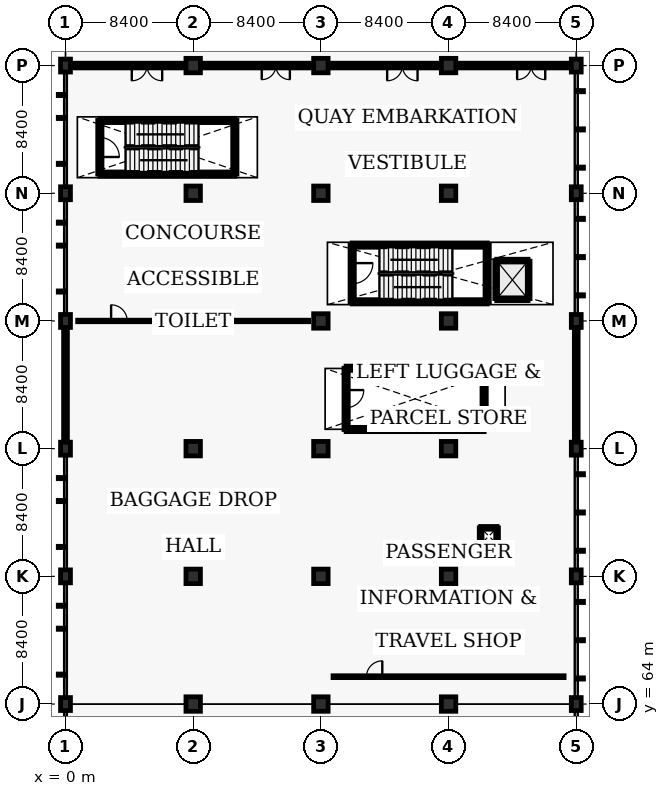
"""IFC4 building model, lengths in metres.
Left out: names, types, materials, properties, quantities, classifications, styles, units other than length and angle.
Written with IfcOpenShell. Run it as: python <this file> out.ifc"""

import sys

from ifc_helpers import new_model, si_unit, direction, frame, frame_2d, origin, origin_2d, place, context, subcontext, project, spatial, rectangle, circle, extrude, element, fill, save


model = new_model("IFC4")
c1 = context("Model", 3, precision=1e-05, world=origin(), true_north=direction((0.0, 1.0)))
c2 = subcontext(c1, "Body", "Model", "MODEL_VIEW")
j1 = project(units=[si_unit("LENGTHUNIT", "METRE"), si_unit("PLANEANGLEUNIT", "RADIAN")], contexts=[c1])
p1 = place(None, origin())
s1 = spatial("IfcSite", under=j1, at=p1, CompositionType="ELEMENT")
p2 = place(p1, origin())
s2 = spatial("IfcBuilding", under=s1, at=p2, CompositionType="ELEMENT")
p3 = place(p2, origin())
s3 = spatial("IfcBuildingStorey", under=s2, at=p3, CompositionType="ELEMENT", Elevation=0.0)
for number, where, z_axis, x_axis in (
    (1, (0.0, 64.0, -0.46), (0.0, 0.0, 1.0), (1.0, 0.0, 0.0)),
    (2, (0.0, 72.4, -0.46), (0.0, 0.0, 1.0), (1.0, 0.0, 0.0)),
    (3, (0.0, 80.8, -0.46), (0.0, 0.0, 1.0), (1.0, 0.0, 0.0)),
    (4, (0.0, 89.2, -0.46), (0.0, 0.0, 1.0), (1.0, 0.0, 0.0)),
    (5, (0.0, 97.6, -0.46), (0.0, 0.0, 1.0), (1.0, 0.0, 0.0)),
    (6, (0.0, 106.0, -0.46), (0.0, 0.0, 1.0), (1.0, 0.0, 0.0)),
):
    element("IfcColumn", number, at=place(p3, frame(where, z_axis=z_axis, x_axis=x_axis)), inside=s3, PredefinedType="COLUMN", context=c2, shape_type="SweptSolid", body=[
        extrude(rectangle(XDim=0.65, YDim=0.85, at=origin_2d()), origin(), (0.0, 0.0, 1.0), 5.9),
    ])
for number, where, z_axis, x_axis in (
    (7, (8.4, 64.0, -0.46), (0.0, 0.0, 1.0), (1.0, 0.0, 0.0)),
    (8, (8.4, 72.4, -0.46), (0.0, 0.0, 1.0), (1.0, 0.0, 0.0)),
    (9, (8.4, 80.8, -0.46), (0.0, 0.0, 1.0), (1.0, 0.0, 0.0)),
    (10, (8.4, 89.2, -0.46), (0.0, 0.0, 1.0), (1.0, 0.0, 0.0)),
    (11, (8.4, 97.6, -0.46), (0.0, 0.0, 1.0), (1.0, 0.0, 0.0)),
    (12, (8.4, 106.0, -0.46), (0.0, 0.0, 1.0), (1.0, 0.0, 0.0)),
    (13, (16.8, 64.0, -0.46), (0.0, 0.0, 1.0), (1.0, 0.0, 0.0)),
    (14, (16.8, 72.4, -0.46), (0.0, 0.0, 1.0), (1.0, 0.0, 0.0)),
    (15, (16.8, 80.8, -0.46), (0.0, 0.0, 1.0), (1.0, 0.0, 0.0)),
    (16, (16.8, 89.2, -0.46), (0.0, 0.0, 1.0), (1.0, 0.0, 0.0)),
    (17, (16.8, 97.6, -0.46), (0.0, 0.0, 1.0), (1.0, 0.0, 0.0)),
    (18, (16.8, 106.0, -0.46), (0.0, 0.0, 1.0), (1.0, 0.0, 0.0)),
    (19, (25.2, 64.0, -0.46), (0.0, 0.0, 1.0), (1.0, 0.0, 0.0)),
    (20, (25.2, 72.4, -0.46), (0.0, 0.0, 1.0), (1.0, 0.0, 0.0)),
    (21, (25.2, 80.8, -0.46), (0.0, 0.0, 1.0), (1.0, 0.0, 0.0)),
    (22, (25.2, 89.2, -0.46), (0.0, 0.0, 1.0), (1.0, 0.0, 0.0)),
    (23, (25.2, 97.6, -0.46), (0.0, 0.0, 1.0), (1.0, 0.0, 0.0)),
    (24, (25.2, 106.0, -0.46), (0.0, 0.0, 1.0), (1.0, 0.0, 0.0)),
):
    element("IfcColumn", number, at=place(p3, frame(where, z_axis=z_axis, x_axis=x_axis)), inside=s3, PredefinedType="COLUMN", context=c2, shape_type="SweptSolid", body=[
        extrude(circle(Radius=0.475, at=origin_2d()), origin(), (0.0, 0.0, 1.0), 5.9),
    ])
for number, where, z_axis, x_axis in (
    (25, (33.6, 64.0, -0.46), (0.0, 0.0, 1.0), (1.0, 0.0, 0.0)),
    (26, (33.6, 72.4, -0.46), (0.0, 0.0, 1.0), (1.0, 0.0, 0.0)),
    (27, (33.6, 80.8, -0.46), (0.0, 0.0, 1.0), (1.0, 0.0, 0.0)),
    (28, (33.6, 89.2, -0.46), (0.0, 0.0, 1.0), (1.0, 0.0, 0.0)),
    (29, (33.6, 97.6, -0.46), (0.0, 0.0, 1.0), (1.0, 0.0, 0.0)),
    (30, (33.6, 106.0, -0.46), (0.0, 0.0, 1.0), (1.0, 0.0, 0.0)),
):
    element("IfcColumn", number, at=place(p3, frame(where, z_axis=z_axis, x_axis=x_axis)), inside=s3, PredefinedType="COLUMN", context=c2, shape_type="SweptSolid", body=[
        extrude(rectangle(XDim=0.65, YDim=0.85, at=origin_2d()), origin(), (0.0, 0.0, 1.0), 5.9),
    ])
p4 = place(p3, frame((7.925, 106.0, 0.0), z_axis=(0.0, 0.0, 1.0), x_axis=(-1.0, 0.0, 0.0)))
e31 = element("IfcWall", 31, at=p4, inside=s3, PredefinedType="SOLIDWALL", context=c2, shape_type="SweptSolid", body=[
    extrude(rectangle(XDim=7.6, YDim=0.31, at=frame_2d((3.8, 0.0))), origin(), (0.0, 0.0, 1.0), 4.795),
])
p5 = place(p4, frame((1.565, 0.0, 0.0)))
e32 = element("IfcOpeningElement", 32, at=p5, cuts=e31, PredefinedType="OPENING", context=c2, shape_type="SweptSolid", body=[
    extrude(rectangle(XDim=2.0, YDim=2.2, at=frame_2d((1.0, 1.1))), frame((0.0, 0.165, 0.0), z_axis=(0.0, -1.0, 0.0), x_axis=(1.0, 0.0, 0.0)), (0.0, 0.0, 1.0), 0.33),
])
p6 = place(p4, frame((4.365, 0.0, 1.0)))
e33 = element("IfcOpeningElement", 33, at=p6, cuts=e31, PredefinedType="OPENING", context=c2, shape_type="SweptSolid", body=[
    extrude(rectangle(XDim=2.6, YDim=1.7, at=frame_2d((1.3, 0.85))), frame((0.0, 0.165, 0.0), z_axis=(0.0, -1.0, 0.0), x_axis=(1.0, 0.0, 0.0)), (0.0, 0.0, 1.0), 0.33),
])
p7 = place(p3, frame((16.325, 106.0, 0.0), z_axis=(0.0, 0.0, 1.0), x_axis=(-1.0, 0.0, 0.0)))
e34 = element("IfcWall", 34, at=p7, inside=s3, PredefinedType="SOLIDWALL", context=c2, shape_type="SweptSolid", body=[
    extrude(rectangle(XDim=7.45, YDim=0.31, at=frame_2d((3.725, 0.0))), origin(), (0.0, 0.0, 1.0), 4.785),
])
p8 = place(p7, frame((1.565, 0.0, 0.0)))
e35 = element("IfcOpeningElement", 35, at=p8, cuts=e34, PredefinedType="OPENING", context=c2, shape_type="SweptSolid", body=[
    extrude(rectangle(XDim=1.85, YDim=2.2, at=frame_2d((0.925, 1.1))), frame((0.0, 0.165, 0.0), z_axis=(0.0, -1.0, 0.0), x_axis=(1.0, 0.0, 0.0)), (0.0, 0.0, 1.0), 0.33),
])
p9 = place(p7, frame((4.365, 0.0, 1.0)))
e36 = element("IfcOpeningElement", 36, at=p9, cuts=e34, PredefinedType="OPENING", context=c2, shape_type="SweptSolid", body=[
    extrude(rectangle(XDim=2.3, YDim=1.7, at=frame_2d((1.15, 0.85))), frame((0.0, 0.165, 0.0), z_axis=(0.0, -1.0, 0.0), x_axis=(1.0, 0.0, 0.0)), (0.0, 0.0, 1.0), 0.33),
])
p10 = place(p3, frame((24.725, 106.0, 0.0), z_axis=(0.0, 0.0, 1.0), x_axis=(-1.0, 0.0, 0.0)))
e37 = element("IfcWall", 37, at=p10, inside=s3, PredefinedType="SOLIDWALL", context=c2, shape_type="SweptSolid", body=[
    extrude(rectangle(XDim=7.45, YDim=0.31, at=frame_2d((3.725, 0.0))), origin(), (0.0, 0.0, 1.0), 4.785),
])
p11 = place(p10, frame((1.565, 0.0, 0.0)))
e38 = element("IfcOpeningElement", 38, at=p11, cuts=e37, PredefinedType="OPENING", context=c2, shape_type="SweptSolid", body=[
    extrude(rectangle(XDim=2.0, YDim=2.2, at=frame_2d((1.0, 1.1))), frame((0.0, 0.165, 0.0), z_axis=(0.0, -1.0, 0.0), x_axis=(1.0, 0.0, 0.0)), (0.0, 0.0, 1.0), 0.33),
])
p12 = place(p10, frame((4.365, 0.0, 1.0)))
e39 = element("IfcOpeningElement", 39, at=p12, cuts=e37, PredefinedType="OPENING", context=c2, shape_type="SweptSolid", body=[
    extrude(rectangle(XDim=2.6, YDim=1.7, at=frame_2d((1.3, 0.85))), frame((0.0, 0.165, 0.0), z_axis=(0.0, -1.0, 0.0), x_axis=(1.0, 0.0, 0.0)), (0.0, 0.0, 1.0), 0.33),
])
p13 = place(p3, frame((33.275, 106.0, 0.0), z_axis=(0.0, 0.0, 1.0), x_axis=(-1.0, 0.0, 0.0)))
e40 = element("IfcWall", 40, at=p13, inside=s3, PredefinedType="SOLIDWALL", context=c2, shape_type="SweptSolid", body=[
    extrude(rectangle(XDim=7.6, YDim=0.31, at=frame_2d((3.8, 0.0))), origin(), (0.0, 0.0, 1.0), 4.785),
])
p14 = place(p13, frame((1.715, 0.0, 0.0)))
e41 = element("IfcOpeningElement", 41, at=p14, cuts=e40, PredefinedType="OPENING", context=c2, shape_type="SweptSolid", body=[
    extrude(rectangle(XDim=1.85, YDim=2.2, at=frame_2d((0.925, 1.1))), frame((0.0, 0.165, 0.0), z_axis=(0.0, -1.0, 0.0), x_axis=(1.0, 0.0, 0.0)), (0.0, 0.0, 1.0), 0.33),
])
p15 = place(p13, frame((4.515, 0.0, 1.0)))
e42 = element("IfcOpeningElement", 42, at=p15, cuts=e40, PredefinedType="OPENING", context=c2, shape_type="SweptSolid", body=[
    extrude(rectangle(XDim=2.3, YDim=1.7, at=frame_2d((1.15, 0.85))), frame((0.0, 0.165, 0.0), z_axis=(0.0, -1.0, 0.0), x_axis=(1.0, 0.0, 0.0)), (0.0, 0.0, 1.0), 0.33),
])
for number, where, z_axis, x_axis in (
    (43, (0.0, 88.775, 0.0), (0.0, 0.0, 1.0), (0.0, -1.0, 0.0)),
    (44, (33.6, 81.225, 0.0), (0.0, 0.0, 1.0), (0.0, 1.0, 0.0)),
):
    element("IfcWall", number, at=place(p3, frame(where, z_axis=z_axis, x_axis=x_axis)), inside=s3, PredefinedType="SOLIDWALL", context=c2, shape_type="SweptSolid", body=[
        extrude(rectangle(XDim=7.55, YDim=0.25, at=frame_2d((3.775, 0.0))), origin(), (0.0, 0.0, 1.0), 4.795),
    ])
for number, where, z_axis, x_axis in (
    (45, (18.86, 90.46, 0.0), (0.0, 0.0, 1.0), (1.0, 0.0, 0.0)),
    (46, (18.86, 94.19, 0.0), (0.0, 0.0, 1.0), (1.0, 0.0, 0.0)),
):
    element("IfcWall", number, at=place(p3, frame(where, z_axis=z_axis, x_axis=x_axis)), inside=s3, PredefinedType="SHEAR", context=c2, shape_type="SweptSolid", body=[
        extrude(rectangle(XDim=8.88, YDim=0.28, at=frame_2d((4.44, 0.0))), origin(), (0.0, 0.0, 1.0), 5.44),
    ])
p16 = place(p3, frame((18.86, 94.19, 0.0), z_axis=(0.0, 0.0, 1.0), x_axis=(0.0, -1.0, 0.0)))
e47 = element("IfcWall", 47, at=p16, inside=s3, PredefinedType="SHEAR", context=c2, shape_type="SweptSolid", body=[
    extrude(rectangle(XDim=3.73, YDim=0.28, at=frame_2d((1.865, 0.0))), origin(), (0.0, 0.0, 1.0), 5.44),
])
p17 = place(p16, frame((1.185, 0.0, 0.0)))
e48 = element("IfcOpeningElement", 48, at=p17, cuts=e47, PredefinedType="OPENING", context=c2, shape_type="SweptSolid", body=[
    extrude(rectangle(XDim=1.36, YDim=2.15, at=frame_2d((0.68, 1.075))), frame((0.0, 0.15, 0.0), z_axis=(0.0, -1.0, 0.0), x_axis=(1.0, 0.0, 0.0)), (0.0, 0.0, 1.0), 0.3),
])
p18 = place(p3, frame((27.74, 90.46, 0.0), z_axis=(0.0, 0.0, 1.0), x_axis=(0.0, 1.0, 0.0)))
e49 = element("IfcWall", 49, at=p18, inside=s3, PredefinedType="SHEAR", context=c2, shape_type="SweptSolid", body=[
    extrude(rectangle(XDim=3.73, YDim=0.28, at=frame_2d((1.865, 0.0))), origin(), (0.0, 0.0, 1.0), 5.44),
])
p19 = place(p3, frame((28.37, 90.67, 0.0), z_axis=(0.0, 0.0, 1.0), x_axis=(1.0, 0.0, 0.0)))
e50 = element("IfcWall", 50, at=p19, inside=s3, PredefinedType="SHEAR", context=c2, shape_type="SweptSolid", body=[
    extrude(rectangle(XDim=2.06, YDim=0.26, at=frame_2d((1.03, 0.0))), origin(), (0.0, 0.0, 1.0), 5.44),
])
for number, where, z_axis, x_axis in (
    (51, (30.43, 90.67, 0.0), (0.0, 0.0, 1.0), (0.0, 1.0, 0.0)),
    (52, (28.37, 93.13, 0.0), (0.0, 0.0, 1.0), (0.0, -1.0, 0.0)),
):
    element("IfcWall", number, at=place(p3, frame(where, z_axis=z_axis, x_axis=x_axis)), inside=s3, PredefinedType="SHEAR", context=c2, shape_type="SweptSolid", body=[
        extrude(rectangle(XDim=2.46, YDim=0.26, at=frame_2d((1.23, 0.0))), origin(), (0.0, 0.0, 1.0), 5.44),
    ])
p20 = place(p3, frame((28.37, 93.13, 0.0), z_axis=(0.0, 0.0, 1.0), x_axis=(1.0, 0.0, 0.0)))
e53 = element("IfcWall", 53, at=p20, inside=s3, PredefinedType="SHEAR", context=c2, shape_type="SweptSolid", body=[
    extrude(rectangle(XDim=2.06, YDim=0.26, at=frame_2d((1.03, 0.0))), origin(), (0.0, 0.0, 1.0), 5.44),
])
p21 = place(p20, frame((0.46, 0.0, 0.0)))
e54 = element("IfcOpeningElement", 54, at=p21, cuts=e53, PredefinedType="OPENING", context=c2, shape_type="SweptSolid", body=[
    extrude(rectangle(XDim=1.14, YDim=2.14, at=frame_2d((0.57, 1.07))), frame((0.0, 0.14, 0.0), z_axis=(0.0, -1.0, 0.0), x_axis=(1.0, 0.0, 0.0)), (0.0, 0.0, 1.0), 0.28),
])
for number, where, z_axis, x_axis in (
    (55, (2.26, 98.86, 0.0), (0.0, 0.0, 1.0), (1.0, 0.0, 0.0)),
    (56, (2.26, 102.39, 0.0), (0.0, 0.0, 1.0), (1.0, 0.0, 0.0)),
):
    element("IfcWall", number, at=place(p3, frame(where, z_axis=z_axis, x_axis=x_axis)), inside=s3, PredefinedType="SHEAR", context=c2, shape_type="SweptSolid", body=[
        extrude(rectangle(XDim=8.88, YDim=0.28, at=frame_2d((4.44, 0.0))), origin(), (0.0, 0.0, 1.0), 5.44),
    ])
p22 = place(p3, frame((2.26, 102.39, 0.0), z_axis=(0.0, 0.0, 1.0), x_axis=(0.0, -1.0, 0.0)))
e57 = element("IfcWall", 57, at=p22, inside=s3, PredefinedType="SHEAR", context=c2, shape_type="SweptSolid", body=[
    extrude(rectangle(XDim=3.53, YDim=0.28, at=frame_2d((1.765, 0.0))), origin(), (0.0, 0.0, 1.0), 5.44),
])
p23 = place(p22, frame((1.125, 0.0, 0.0)))
e58 = element("IfcOpeningElement", 58, at=p23, cuts=e57, PredefinedType="OPENING", context=c2, shape_type="SweptSolid", body=[
    extrude(rectangle(XDim=1.28, YDim=2.1, at=frame_2d((0.64, 1.05))), frame((0.0, 0.15, 0.0), z_axis=(0.0, -1.0, 0.0), x_axis=(1.0, 0.0, 0.0)), (0.0, 0.0, 1.0), 0.3),
])
p24 = place(p3, frame((11.14, 98.86, 0.0), z_axis=(0.0, 0.0, 1.0), x_axis=(0.0, 1.0, 0.0)))
e59 = element("IfcWall", 59, at=p24, inside=s3, PredefinedType="SHEAR", context=c2, shape_type="SweptSolid", body=[
    extrude(rectangle(XDim=3.53, YDim=0.28, at=frame_2d((1.765, 0.0))), origin(), (0.0, 0.0, 1.0), 5.44),
])
for number, where, z_axis, x_axis in (
    (60, (18.46, 82.06, 0.0), (0.0, 0.0, 1.0), (1.0, 0.0, 0.0)),
    (61, (18.46, 86.09, 0.0), (0.0, 0.0, 1.0), (1.0, 0.0, 0.0)),
):
    element("IfcWall", number, at=place(p3, frame(where, z_axis=z_axis, x_axis=x_axis)), inside=s3, PredefinedType="SHEAR", context=c2, shape_type="SweptSolid", body=[
        extrude(rectangle(XDim=9.08, YDim=0.28, at=frame_2d((4.54, 0.0))), origin(), (0.0, 0.0, 1.0), 5.44),
    ])
p25 = place(p3, frame((18.46, 86.09, 0.0), z_axis=(0.0, 0.0, 1.0), x_axis=(0.0, -1.0, 0.0)))
e62 = element("IfcWall", 62, at=p25, inside=s3, PredefinedType="SHEAR", context=c2, shape_type="SweptSolid", body=[
    extrude(rectangle(XDim=4.03, YDim=0.28, at=frame_2d((2.015, 0.0))), origin(), (0.0, 0.0, 1.0), 5.44),
])
p26 = place(p25, frame((1.435, 0.0, 0.0)))
e63 = element("IfcOpeningElement", 63, at=p26, cuts=e62, PredefinedType="OPENING", context=c2, shape_type="SweptSolid", body=[
    extrude(rectangle(XDim=1.16, YDim=2.14, at=frame_2d((0.58, 1.07))), frame((0.0, 0.15, 0.0), z_axis=(0.0, -1.0, 0.0), x_axis=(1.0, 0.0, 0.0)), (0.0, 0.0, 1.0), 0.3),
])
p27 = place(p3, frame((27.54, 82.06, 0.0), z_axis=(0.0, 0.0, 1.0), x_axis=(0.0, 1.0, 0.0)))
e64 = element("IfcWall", 64, at=p27, inside=s3, PredefinedType="SHEAR", context=c2, shape_type="SweptSolid", body=[
    extrude(rectangle(XDim=4.03, YDim=0.28, at=frame_2d((2.015, 0.0))), origin(), (0.0, 0.0, 1.0), 5.44),
])
p28 = place(p3, frame((27.31, 74.51, 0.0), z_axis=(0.0, 0.0, 1.0), x_axis=(1.0, 0.0, 0.0)))
e65 = element("IfcWall", 65, at=p28, inside=s3, PredefinedType="SOLIDWALL", context=c2, shape_type="SweptSolid", body=[
    extrude(rectangle(XDim=1.08, YDim=0.18, at=frame_2d((0.54, 0.0))), origin(), (0.0, 0.0, 1.0), 2.6),
])
p29 = place(p3, frame((28.39, 74.51, 0.0), z_axis=(0.0, 0.0, 1.0), x_axis=(0.0, 1.0, 0.0)))
e66 = element("IfcWall", 66, at=p29, inside=s3, PredefinedType="SOLIDWALL", context=c2, shape_type="SweptSolid", body=[
    extrude(rectangle(XDim=1.08, YDim=0.18, at=frame_2d((0.54, 0.0))), origin(), (0.0, 0.0, 1.0), 2.6),
])
p30 = place(p3, frame((28.39, 75.59, 0.0), z_axis=(0.0, 0.0, 1.0), x_axis=(-1.0, 0.0, 0.0)))
e67 = element("IfcWall", 67, at=p30, inside=s3, PredefinedType="SOLIDWALL", context=c2, shape_type="SweptSolid", body=[
    extrude(rectangle(XDim=1.08, YDim=0.18, at=frame_2d((0.54, 0.0))), origin(), (0.0, 0.0, 1.0), 2.6),
])
p31 = place(p3, frame((27.31, 75.59, 0.0), z_axis=(0.0, 0.0, 1.0), x_axis=(0.0, -1.0, 0.0)))
e68 = element("IfcWall", 68, at=p31, inside=s3, PredefinedType="SOLIDWALL", context=c2, shape_type="SweptSolid", body=[
    extrude(rectangle(XDim=1.08, YDim=0.18, at=frame_2d((0.54, 0.0))), origin(), (0.0, 0.0, 1.0), 2.6),
])
p32 = place(p3, frame((17.6, 65.8, 0.0), z_axis=(0.0, 0.0, 1.0), x_axis=(1.0, 0.0, 0.0)))
e69 = element("IfcWall", 69, at=p32, inside=s3, PredefinedType="PARTITIONING", context=c2, shape_type="SweptSolid", body=[
    extrude(rectangle(XDim=15.2, YDim=0.12, at=frame_2d((7.6, 0.0))), origin(), (0.0, 0.0, 1.0), 3.1),
])
p33 = place(p32, frame((2.2, 0.0, 0.0)))
e70 = element("IfcOpeningElement", 70, at=p33, cuts=e69, PredefinedType="OPENING", context=c2, shape_type="SweptSolid", body=[
    extrude(rectangle(XDim=1.04, YDim=2.14, at=frame_2d((0.52, 1.07))), frame((0.0, 0.07, 0.0), z_axis=(0.0, -1.0, 0.0), x_axis=(1.0, 0.0, 0.0)), (0.0, 0.0, 1.0), 0.14),
])
p34 = place(p3, frame((0.8, 89.2, 0.0), z_axis=(0.0, 0.0, 1.0), x_axis=(1.0, 0.0, 0.0)))
e71 = element("IfcWall", 71, at=p34, inside=s3, PredefinedType="PARTITIONING", context=c2, shape_type="SweptSolid", body=[
    extrude(rectangle(XDim=15.2, YDim=0.1, at=frame_2d((7.6, 0.0))), origin(), (0.0, 0.0, 1.0), 3.0),
])
p35 = place(p34, frame((2.2, 0.0, 0.0)))
e72 = element("IfcOpeningElement", 72, at=p35, cuts=e71, PredefinedType="OPENING", context=c2, shape_type="SweptSolid", body=[
    extrude(rectangle(XDim=1.06, YDim=2.1, at=frame_2d((0.53, 1.05))), frame((0.0, 0.06, 0.0), z_axis=(0.0, -1.0, 0.0), x_axis=(1.0, 0.0, 0.0)), (0.0, 0.0, 1.0), 0.12),
])
p36 = place(p5, origin())
e73 = element("IfcDoor", 73, at=p36, inside=s3, OperationType="DOUBLE_DOOR_SINGLE_SWING", PredefinedType="DOOR", context=c2, shape_type="SweptSolid", body=[
    extrude(rectangle(XDim=2.0, YDim=2.2, at=frame_2d((1.0, 1.1))), frame((0.0, 0.025, 0.0), z_axis=(0.0, -1.0, 0.0), x_axis=(1.0, 0.0, 0.0)), (0.0, 0.0, 1.0), 0.05),
])
fill(e32, e73)
p37 = place(p6, origin())
e74 = element("IfcWindow", 74, at=p37, inside=s3, PartitioningType="TRIPLE_PANEL_VERTICAL", PredefinedType="WINDOW", context=c2, shape_type="SweptSolid", body=[
    extrude(rectangle(XDim=2.6, YDim=1.7, at=frame_2d((1.3, 0.85))), frame((0.0, 0.03, 0.0), z_axis=(0.0, -1.0, 0.0), x_axis=(1.0, 0.0, 0.0)), (0.0, 0.0, 1.0), 0.06),
])
fill(e33, e74)
p38 = place(p8, origin())
e75 = element("IfcDoor", 75, at=p38, inside=s3, OperationType="DOUBLE_DOOR_SINGLE_SWING", PredefinedType="DOOR", context=c2, shape_type="SweptSolid", body=[
    extrude(rectangle(XDim=1.85, YDim=2.2, at=frame_2d((0.925, 1.1))), frame((0.0, 0.025, 0.0), z_axis=(0.0, -1.0, 0.0), x_axis=(1.0, 0.0, 0.0)), (0.0, 0.0, 1.0), 0.05),
])
fill(e35, e75)
p39 = place(p9, origin())
e76 = element("IfcWindow", 76, at=p39, inside=s3, PartitioningType="TRIPLE_PANEL_VERTICAL", PredefinedType="WINDOW", context=c2, shape_type="SweptSolid", body=[
    extrude(rectangle(XDim=2.3, YDim=1.7, at=frame_2d((1.15, 0.85))), frame((0.0, 0.03, 0.0), z_axis=(0.0, -1.0, 0.0), x_axis=(1.0, 0.0, 0.0)), (0.0, 0.0, 1.0), 0.06),
])
fill(e36, e76)
p40 = place(p11, origin())
e77 = element("IfcDoor", 77, at=p40, inside=s3, OperationType="DOUBLE_DOOR_SINGLE_SWING", PredefinedType="DOOR", context=c2, shape_type="SweptSolid", body=[
    extrude(rectangle(XDim=2.0, YDim=2.2, at=frame_2d((1.0, 1.1))), frame((0.0, 0.025, 0.0), z_axis=(0.0, -1.0, 0.0), x_axis=(1.0, 0.0, 0.0)), (0.0, 0.0, 1.0), 0.05),
])
fill(e38, e77)
p41 = place(p12, origin())
e78 = element("IfcWindow", 78, at=p41, inside=s3, PartitioningType="TRIPLE_PANEL_VERTICAL", PredefinedType="WINDOW", context=c2, shape_type="SweptSolid", body=[
    extrude(rectangle(XDim=2.6, YDim=1.7, at=frame_2d((1.3, 0.85))), frame((0.0, 0.03, 0.0), z_axis=(0.0, -1.0, 0.0), x_axis=(1.0, 0.0, 0.0)), (0.0, 0.0, 1.0), 0.06),
])
fill(e39, e78)
p42 = place(p14, origin())
e79 = element("IfcDoor", 79, at=p42, inside=s3, OperationType="DOUBLE_DOOR_SINGLE_SWING", PredefinedType="DOOR", context=c2, shape_type="SweptSolid", body=[
    extrude(rectangle(XDim=1.85, YDim=2.2, at=frame_2d((0.925, 1.1))), frame((0.0, 0.025, 0.0), z_axis=(0.0, -1.0, 0.0), x_axis=(1.0, 0.0, 0.0)), (0.0, 0.0, 1.0), 0.05),
])
fill(e41, e79)
p43 = place(p15, origin())
e80 = element("IfcWindow", 80, at=p43, inside=s3, PartitioningType="TRIPLE_PANEL_VERTICAL", PredefinedType="WINDOW", context=c2, shape_type="SweptSolid", body=[
    extrude(rectangle(XDim=2.3, YDim=1.7, at=frame_2d((1.15, 0.85))), frame((0.0, 0.03, 0.0), z_axis=(0.0, -1.0, 0.0), x_axis=(1.0, 0.0, 0.0)), (0.0, 0.0, 1.0), 0.06),
])
fill(e42, e80)
p44 = place(p17, origin())
e81 = element("IfcDoor", 81, at=p44, inside=s3, OperationType="SINGLE_SWING_LEFT", PredefinedType="DOOR", context=c2, shape_type="SweptSolid", body=[
    extrude(rectangle(XDim=1.36, YDim=2.15, at=frame_2d((0.68, 1.075))), frame((0.0, 0.025, 0.0), z_axis=(0.0, -1.0, 0.0), x_axis=(1.0, 0.0, 0.0)), (0.0, 0.0, 1.0), 0.05),
])
fill(e48, e81)
p45 = place(p21, origin())
e82 = element("IfcDoor", 82, at=p45, inside=s3, OperationType="DOUBLE_DOOR_SLIDING", PredefinedType="DOOR", context=c2, shape_type="SweptSolid", body=[
    extrude(rectangle(XDim=1.14, YDim=2.14, at=frame_2d((0.57, 1.07))), frame((0.0, 0.025, 0.0), z_axis=(0.0, -1.0, 0.0), x_axis=(1.0, 0.0, 0.0)), (0.0, 0.0, 1.0), 0.05),
])
fill(e54, e82)
p46 = place(p23, origin())
e83 = element("IfcDoor", 83, at=p46, inside=s3, OperationType="SINGLE_SWING_RIGHT", PredefinedType="DOOR", context=c2, shape_type="SweptSolid", body=[
    extrude(rectangle(XDim=1.28, YDim=2.1, at=frame_2d((0.64, 1.05))), frame((0.0, 0.025, 0.0), z_axis=(0.0, -1.0, 0.0), x_axis=(1.0, 0.0, 0.0)), (0.0, 0.0, 1.0), 0.05),
])
fill(e58, e83)
p47 = place(p26, origin())
e84 = element("IfcDoor", 84, at=p47, inside=s3, OperationType="SINGLE_SWING_LEFT", PredefinedType="DOOR", context=c2, shape_type="SweptSolid", body=[
    extrude(rectangle(XDim=1.16, YDim=2.14, at=frame_2d((0.58, 1.07))), frame((0.0, 0.025, 0.0), z_axis=(0.0, -1.0, 0.0), x_axis=(1.0, 0.0, 0.0)), (0.0, 0.0, 1.0), 0.05),
])
fill(e63, e84)
p48 = place(p33, origin())
e85 = element("IfcDoor", 85, at=p48, inside=s3, OperationType="SINGLE_SWING_RIGHT", PredefinedType="DOOR", context=c2, shape_type="SweptSolid", body=[
    extrude(rectangle(XDim=1.04, YDim=2.14, at=frame_2d((0.52, 1.07))), frame((0.0, 0.025, 0.0), z_axis=(0.0, -1.0, 0.0), x_axis=(1.0, 0.0, 0.0)), (0.0, 0.0, 1.0), 0.05),
])
fill(e70, e85)
p49 = place(p35, origin())
e86 = element("IfcDoor", 86, at=p49, inside=s3, OperationType="SINGLE_SWING_LEFT", PredefinedType="DOOR", context=c2, shape_type="SweptSolid", body=[
    extrude(rectangle(XDim=1.06, YDim=2.1, at=frame_2d((0.53, 1.05))), frame((0.0, 0.025, 0.0), z_axis=(0.0, -1.0, 0.0), x_axis=(1.0, 0.0, 0.0)), (0.0, 0.0, 1.0), 0.05),
])
fill(e72, e86)
save(model, sys.argv[1])
